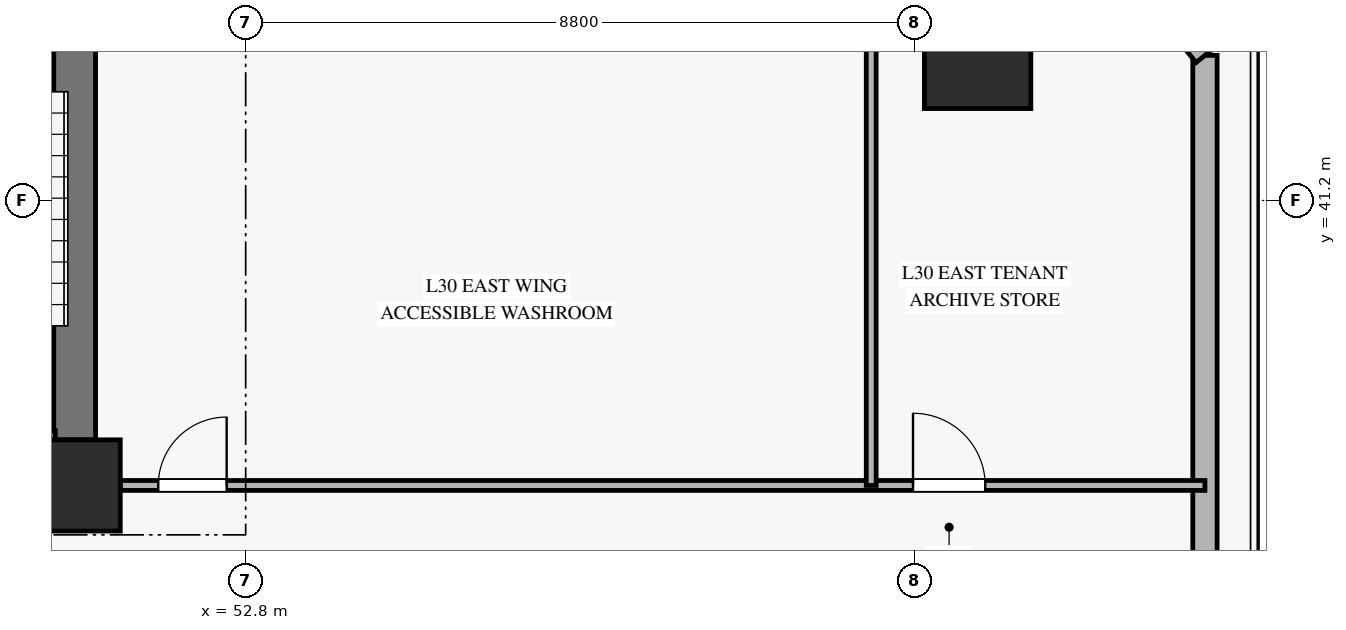
"""IFC4 building model, lengths in metres.
Left out: names, types, materials, properties, quantities, classifications, styles, units other than length and angle.
Written with IfcOpenShell. Run it as: python <this file> out.ifc"""

import sys

from ifc_helpers import new_model, si_unit, direction, frame, frame_2d, origin, origin_2d, place, context, subcontext, project, spatial, rectangle, hollow_rectangle, extrude, source, transform, mapped, element, fill, save


model = new_model("IFC4")
c1 = context("Model", 3, precision=1e-05, world=origin(), true_north=direction((0.0, 1.0)))
c2 = subcontext(c1, "Body", "Model", "MODEL_VIEW")
j1 = project(units=[si_unit("LENGTHUNIT", "METRE"), si_unit("PLANEANGLEUNIT", "RADIAN")], contexts=[c1])
p1 = place(None, origin())
s1 = spatial("IfcSite", under=j1, at=p1, CompositionType="ELEMENT")
p2 = place(p1, origin())
s2 = spatial("IfcBuilding", under=s1, at=p2, CompositionType="ELEMENT")
p3 = place(p2, frame((0.0, 0.0, 123.1)))
s3 = spatial("IfcBuildingStorey", under=s2, at=p3, CompositionType="ELEMENT", Elevation=123.1)
m1 = source(origin(), c2, "Body", "SweptSolid", [
    extrude(rectangle(XDim=1.2, YDim=1.2, at=origin_2d()), origin(), (0.0, 0.0, 1.0), 3.68),
])
p4 = place(p3, frame((50.55, 37.45, 0.0), z_axis=(0.0, 0.0, 1.0), x_axis=(1.0, 0.0, 0.0)))
e1 = element("IfcColumn", 1, at=p4, inside=s3, PredefinedType="PILASTER", context=c2, shape_type="MappedRepresentation", body=[
    mapped(m1, transform((0.0, 0.0, 0.0), x_axis=(1.0, 0.0, 0.0), y_axis=(0.0, 1.0, 0.0), z_axis=(0.0, 0.0, 1.0), scale=1.0)),
])
p5 = place(p3, frame((50.55, 38.05, 0.0), z_axis=(0.0, 0.0, 1.0), x_axis=(0.0, 1.0, 0.0)))
e2 = element("IfcWall", 2, at=p5, inside=s3, PredefinedType="SHEAR", context=c2, shape_type="SweptSolid", body=[
    extrude(rectangle(XDim=7.9, YDim=0.55, at=frame_2d((3.95, 0.0))), origin(), (0.0, 0.0, 1.0), 3.68),
])
m2 = source(origin(), c2, "Body", "SweptSolid", [
    extrude(hollow_rectangle(XDim=1.4, YDim=1.4, WallThickness=0.065, at=origin_2d()), origin(), (0.0, 0.0, 1.0), 3.68),
])
p6 = place(p3, frame((62.43, 43.109, 0.0), z_axis=(0.0, 0.0, 1.0), x_axis=(1.0, 0.0, 0.0)))
e3 = element("IfcColumn", 3, at=p6, inside=s3, PredefinedType="COLUMN", context=c2, shape_type="MappedRepresentation", body=[
    mapped(m2, transform((0.0, 0.0, 0.0), x_axis=(1.0, 0.0, 0.0), y_axis=(0.0, 1.0, 0.0), z_axis=(0.0, 0.0, 1.0), scale=1.0)),
])
p7 = place(p3, frame((65.421, 27.259, 0.0), z_axis=(0.0, 0.0, 1.0), x_axis=(0.0, 1.0, 0.0)))
e4 = element("IfcWall", 4, at=p7, inside=s3, PredefinedType="SOLIDWALL", context=c2, shape_type="SweptSolid", body=[
    extrude(rectangle(XDim=15.85, YDim=0.32, at=frame_2d((7.925, 0.0))), origin(), (0.0, 0.0, 1.0), 3.16),
])
p8 = place(p7, frame((3.076, 0.0, 0.45)))
e5 = element("IfcOpeningElement", 5, at=p8, cuts=e4, PredefinedType="OPENING", context=c2, shape_type="SweptSolid", body=[
    extrude(rectangle(XDim=2.4, YDim=2.1, at=frame_2d((1.2, 1.05))), frame((0.0, 0.17, 0.0), z_axis=(0.0, -1.0, 0.0), x_axis=(1.0, 0.0, 0.0)), (0.0, 0.0, 1.0), 0.34),
])
p9 = place(p3, frame((65.421, 43.109, 0.0), z_axis=(0.0, 0.0, 1.0), x_axis=(-0.62893048879, 0.7774615362, 0.0)))
e6 = element("IfcWall", 6, at=p9, inside=s3, PredefinedType="SOLIDWALL", context=c2, shape_type="SweptSolid", body=[
    extrude(rectangle(XDim=4.04, YDim=0.3, at=frame_2d((2.02, 0.0))), origin(), (0.0, 0.0, 1.0), 3.16),
])
p10 = place(p9, frame((1.22, 0.0, 0.45)))
e7 = element("IfcOpeningElement", 7, at=p10, cuts=e6, PredefinedType="OPENING", context=c2, shape_type="SweptSolid", body=[
    extrude(rectangle(XDim=1.6, YDim=2.0, at=frame_2d((0.8, 1.0))), frame((0.0, 0.16, 0.0), z_axis=(0.0, -1.0, 0.0), x_axis=(1.0, 0.0, 0.0)), (0.0, 0.0, 1.0), 0.32),
])
p11 = place(p3, frame((47.44, 38.07, 0.0), z_axis=(0.0, 0.0, 1.0), x_axis=(1.0, 0.0, 0.0)))
e8 = element("IfcWall", 8, at=p11, inside=s3, PredefinedType="SOLIDWALL", context=c2, shape_type="SweptSolid", body=[
    extrude(rectangle(XDim=2.855, YDim=0.2, at=frame_2d((1.427, 0.0))), origin(), (0.0, 0.0, 1.0), 3.9),
])
p12 = place(p3, frame((51.15, 37.45, 0.0), z_axis=(0.0, 0.0, 1.0), x_axis=(1.0, 0.0, 0.0)))
e9 = element("IfcWall", 9, at=p12, inside=s3, PredefinedType="PARTITIONING", context=c2, shape_type="SweptSolid", body=[
    extrude(rectangle(XDim=14.271, YDim=0.13, at=frame_2d((7.135, 0.0))), origin(), (0.0, 0.0, 1.0), 3.165),
])
p13 = place(p12, frame((0.5, 0.0, 0.0)))
e10 = element("IfcOpeningElement", 10, at=p13, cuts=e9, PredefinedType="OPENING", context=c2, shape_type="SweptSolid", body=[
    extrude(rectangle(XDim=0.9, YDim=2.1, at=frame_2d((0.45, 1.05))), frame((0.0, 0.075, 0.0), z_axis=(0.0, -1.0, 0.0), x_axis=(1.0, 0.0, 0.0)), (0.0, 0.0, 1.0), 0.15),
])
p14 = place(p12, frame((10.43, 0.0, 0.0)))
e11 = element("IfcOpeningElement", 11, at=p14, cuts=e9, PredefinedType="OPENING", context=c2, shape_type="SweptSolid", body=[
    extrude(rectangle(XDim=0.95, YDim=2.1, at=frame_2d((0.475, 1.05))), frame((0.0, 0.075, 0.0), z_axis=(0.0, -1.0, 0.0), x_axis=(1.0, 0.0, 0.0)), (0.0, 0.0, 1.0), 0.15),
])
p15 = place(p3, frame((61.03, 37.45, 0.0), z_axis=(0.0, 0.0, 1.0), x_axis=(0.0, 1.0, 0.0)))
e12 = element("IfcWall", 12, at=p15, inside=s3, PredefinedType="PARTITIONING", context=c2, shape_type="SweptSolid", body=[
    extrude(rectangle(XDim=8.8, YDim=0.13, at=frame_2d((4.4, 0.0))), origin(), (0.0, 0.0, 1.0), 3.68),
])
m3 = source(origin(), c2, "Body", "SweptSolid", [
    extrude(rectangle(XDim=0.9, YDim=2.1, at=frame_2d((0.45, 1.05))), frame((0.0, 0.025, 0.0), z_axis=(0.0, -1.0, 0.0), x_axis=(1.0, 0.0, 0.0)), (0.0, 0.0, 1.0), 0.05),
])
p16 = place(p13, origin())
e13 = element("IfcDoor", 13, at=p16, inside=s3, OperationType="SINGLE_SWING_RIGHT", PredefinedType="DOOR", context=c2, shape_type="MappedRepresentation", body=[
    mapped(m3, transform((0.0, 0.0, 0.0), x_axis=(1.0, 0.0, 0.0), y_axis=(0.0, 1.0, 0.0), z_axis=(0.0, 0.0, 1.0), scale=1.0)),
])
fill(e10, e13)
m4 = source(origin(), c2, "Body", "SweptSolid", [
    extrude(rectangle(XDim=0.95, YDim=2.1, at=frame_2d((0.475, 1.05))), frame((0.0, 0.025, 0.0), z_axis=(0.0, -1.0, 0.0), x_axis=(1.0, 0.0, 0.0)), (0.0, 0.0, 1.0), 0.05),
])
p17 = place(p14, origin())
e14 = element("IfcDoor", 14, at=p17, inside=s3, OperationType="SINGLE_SWING_LEFT", PredefinedType="DOOR", context=c2, shape_type="MappedRepresentation", body=[
    mapped(m4, transform((0.0, 0.0, 0.0), x_axis=(1.0, 0.0, 0.0), y_axis=(0.0, 1.0, 0.0), z_axis=(0.0, 0.0, 1.0), scale=1.0)),
])
fill(e11, e14)
save(model, sys.argv[1])
